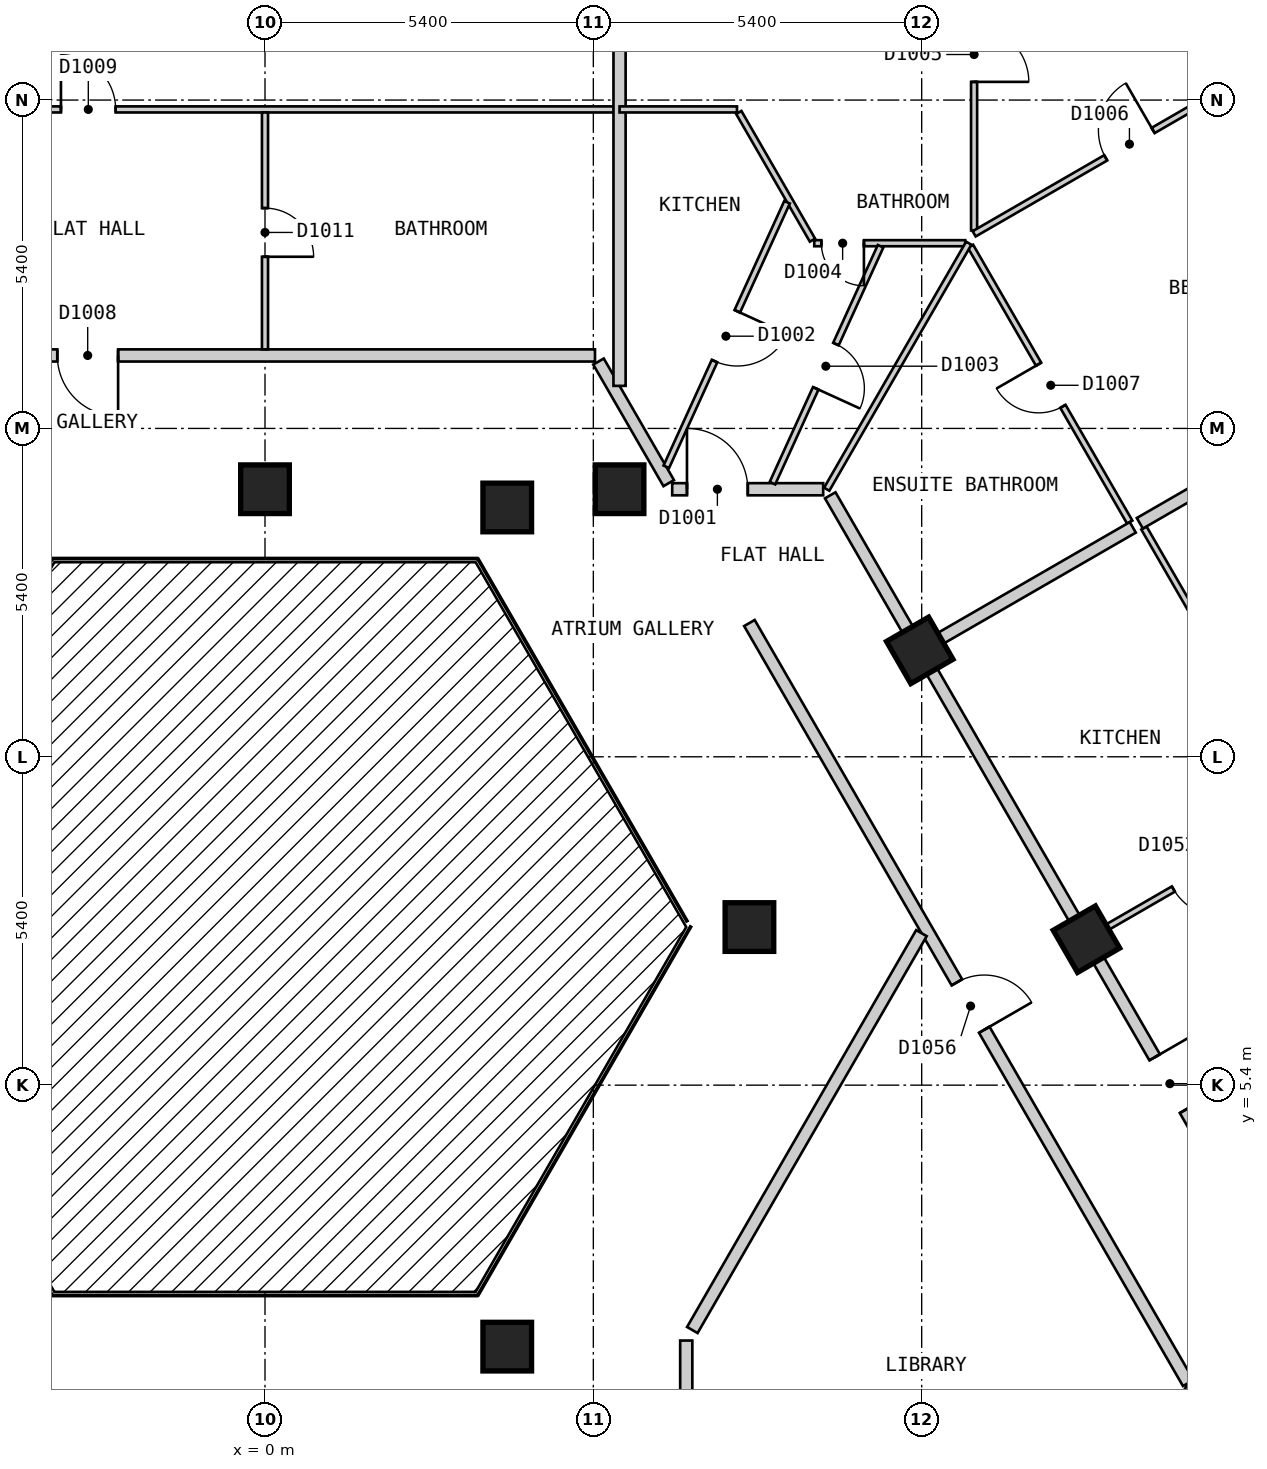
"""IFC4 building model, lengths in metres.
Left out: names, types, materials, properties, quantities, classifications, styles, units other than length and angle.
Written with IfcOpenShell. Run it as: python <this file> out.ifc"""

import sys

from ifc_helpers import new_model, si_unit, direction, frame, frame_2d, origin, origin_2d, place, context, subcontext, project, spatial, rectangle, extrude, element, fill, save


model = new_model("IFC4")
c1 = context("Model", 3, precision=1e-05, world=origin(), true_north=direction((0.0, 1.0)))
c2 = subcontext(c1, "Body", "Model", "MODEL_VIEW")
j1 = project(units=[si_unit("LENGTHUNIT", "METRE"), si_unit("PLANEANGLEUNIT", "RADIAN")], contexts=[c1])
p1 = place(None, origin())
s1 = spatial("IfcSite", under=j1, at=p1, CompositionType="ELEMENT")
p2 = place(p1, origin())
s2 = spatial("IfcBuilding", under=s1, at=p2, CompositionType="ELEMENT")
p3 = place(p2, frame((0.0, 0.0, 120.6)))
s3 = spatial("IfcBuildingStorey", under=s2, at=p3, CompositionType="ELEMENT", Elevation=120.6)
for number, where, z_axis, x_axis in (
    (1, (3.984, 1.1, 0.0), (0.0, 0.0, 1.0), (1.0, 0.0, 0.0)),
    (2, (13.51, 7.8, 0.0), (0.0, 0.0, 1.0), (-0.5, 0.866, 0.0)),
    (3, (7.967, 8.0, 0.0), (0.0, 0.0, 1.0), (1.0, 0.0, 0.0)),
    (4, (10.768, 12.55, 0.0), (0.0, 0.0, 1.0), (-0.5, 0.866, 0.0)),
    (5, (5.831, 15.2, 0.0), (0.0, 0.0, 1.0), (-1.0, 0.0, 0.0)),
    (6, (3.984, 14.9, 0.0), (0.0, 0.0, 1.0), (1.0, 0.0, 0.0)),
    (7, (0.0, 15.2, 0.0), (0.0, 0.0, 1.0), (-1.0, 0.0, 0.0)),
):
    element("IfcColumn", number, at=place(p3, frame(where, z_axis=z_axis, x_axis=x_axis)), inside=s3, PredefinedType="COLUMN", context=c2, shape_type="SweptSolid", body=[
        extrude(rectangle(XDim=0.8, YDim=0.8, at=origin_2d()), origin(), (0.0, 0.0, 1.0), 3.0),
    ])
p4 = place(p3, frame((5.485, 17.3, 0.0), z_axis=(0.0, 0.0, 1.0), x_axis=(0.500027479704, -0.866009537788, 0.0)))
e8 = element("IfcWall", 8, at=p4, inside=s3, PredefinedType="PARTITIONING", context=c2, shape_type="SweptSolid", body=[
    extrude(rectangle(XDim=2.309, YDim=0.2, at=frame_2d((1.155, 0.0))), origin(), (0.0, 0.0, 1.0), 2.7),
])
p5 = place(p3, frame((7.967, 13.0, 0.0), z_axis=(0.0, 0.0, 1.0), x_axis=(0.50003774998, -0.866003607726, 0.0)))
e9 = element("IfcWall", 9, at=p5, inside=s3, PredefinedType="PARTITIONING", context=c2, shape_type="SweptSolid", body=[
    extrude(rectangle(XDim=14.433, YDim=0.2, at=frame_2d((7.217, 0.0))), origin(), (0.0, 0.0, 1.0), 2.7),
])
p6 = place(p5, frame((6.824, 0.0, 0.0)))
e10 = element("IfcOpeningElement", 10, at=p6, cuts=e9, PredefinedType="OPENING", context=c2, shape_type="SweptSolid", body=[
    extrude(rectangle(XDim=0.9, YDim=2.1, at=frame_2d((0.45, 1.05))), frame((0.0, 0.11, 0.0), z_axis=(0.0, -1.0, 0.0), x_axis=(1.0, 0.0, 0.0)), (0.0, 0.0, 1.0), 0.22),
])
p7 = place(p3, frame((9.296, 15.1, 0.0), z_axis=(0.0, 0.0, 1.0), x_axis=(0.499974024244, -0.866040400375, 0.0)))
e11 = element("IfcWall", 11, at=p7, inside=s3, PredefinedType="PARTITIONING", context=c2, shape_type="SweptSolid", body=[
    extrude(rectangle(XDim=16.857, YDim=0.2, at=frame_2d((8.429, 0.0))), origin(), (0.0, 0.0, 1.0), 2.7),
])
p8 = place(p7, frame((10.672, 0.0, 0.0)))
e12 = element("IfcOpeningElement", 12, at=p8, cuts=e11, PredefinedType="OPENING", context=c2, shape_type="SweptSolid", body=[
    extrude(rectangle(XDim=1.0, YDim=2.1, at=frame_2d((0.5, 1.05))), frame((0.0, 0.11, 0.0), z_axis=(0.0, -1.0, 0.0), x_axis=(1.0, 0.0, 0.0)), (0.0, 0.0, 1.0), 0.22),
])
p9 = place(p3, frame((6.697, 15.2, 0.0), z_axis=(0.0, 0.0, 1.0), x_axis=(1.0, 0.0, 0.0)))
e13 = element("IfcWall", 13, at=p9, inside=s3, PredefinedType="PARTITIONING", context=c2, shape_type="SweptSolid", body=[
    extrude(rectangle(XDim=2.483, YDim=0.2, at=frame_2d((1.241, 0.0))), origin(), (0.0, 0.0, 1.0), 2.7),
])
p10 = place(p9, frame((0.243, 0.0, 0.0)))
e14 = element("IfcOpeningElement", 14, at=p10, cuts=e13, PredefinedType="OPENING", context=c2, shape_type="SweptSolid", body=[
    extrude(rectangle(XDim=1.0, YDim=2.1, at=frame_2d((0.5, 1.05))), frame((0.0, 0.11, 0.0), z_axis=(0.0, -1.0, 0.0), x_axis=(1.0, 0.0, 0.0)), (0.0, 0.0, 1.0), 0.22),
])
p11 = place(p3, frame((-5.312, 17.4, 0.0), z_axis=(0.0, 0.0, 1.0), x_axis=(1.0, 0.0, 0.0)))
e15 = element("IfcWall", 15, at=p11, inside=s3, PredefinedType="PARTITIONING", context=c2, shape_type="SweptSolid", body=[
    extrude(rectangle(XDim=10.739, YDim=0.2, at=frame_2d((5.37, 0.0))), origin(), (0.0, 0.0, 1.0), 2.7),
])
p12 = place(p11, frame((1.896, 0.0, 0.0)))
e16 = element("IfcOpeningElement", 16, at=p12, cuts=e15, PredefinedType="OPENING", context=c2, shape_type="SweptSolid", body=[
    extrude(rectangle(XDim=1.0, YDim=2.1, at=frame_2d((0.5, 1.05))), frame((0.0, 0.11, 0.0), z_axis=(0.0, -1.0, 0.0), x_axis=(1.0, 0.0, 0.0)), (0.0, 0.0, 1.0), 0.22),
])
p13 = place(p3, frame((7.028, 1.373, 0.0), z_axis=(0.0, 0.0, 1.0), x_axis=(0.499954271211, 0.866051803703, 0.0)))
e17 = element("IfcWall", 17, at=p13, inside=s3, PredefinedType="PARTITIONING", context=c2, shape_type="SweptSolid", body=[
    extrude(rectangle(XDim=7.536, YDim=0.2, at=frame_2d((3.768, 0.0))), origin(), (0.0, 0.0, 1.0), 2.7),
])
p14 = place(p3, frame((13.394, -2.8, 0.0), z_axis=(0.0, 0.0, 1.0), x_axis=(0.499968324138, 0.866043691079, 0.0)))
e18 = element("IfcWall", 18, at=p14, inside=s3, PredefinedType="PARTITIONING", context=c2, shape_type="SweptSolid", body=[
    extrude(rectangle(XDim=3.696, YDim=0.2, at=frame_2d((1.848, 0.0))), origin(), (0.0, 0.0, 1.0), 2.7),
])
p15 = place(p3, frame((6.928, -2.8, 0.0), z_axis=(0.0, 0.0, 1.0), x_axis=(0.0, 1.0, 0.0)))
e19 = element("IfcWall", 19, at=p15, inside=s3, PredefinedType="PARTITIONING", context=c2, shape_type="SweptSolid", body=[
    extrude(rectangle(XDim=4.0, YDim=0.2, at=frame_2d((2.0, 0.0))), origin(), (0.0, 0.0, 1.0), 2.7),
])
p16 = place(p3, frame((7.792, 21.396, 0.0), z_axis=(0.0, 0.0, 1.0), x_axis=(0.499821239653, -0.866128586522, 0.0)))
e20 = element("IfcWall", 20, at=p16, inside=s3, PredefinedType="PARTITIONING", context=c2, shape_type="SweptSolid", body=[
    extrude(rectangle(XDim=2.425, YDim=0.1, at=frame_2d((1.212, 0.0))), origin(), (0.0, 0.0, 1.0), 2.7),
])
p17 = place(p3, frame((11.603, 19.196, 0.0), z_axis=(0.0, 0.0, 1.0), x_axis=(0.499913406181, -0.866075392977, 0.0)))
e21 = element("IfcWall", 21, at=p17, inside=s3, PredefinedType="PARTITIONING", context=c2, shape_type="SweptSolid", body=[
    extrude(rectangle(XDim=5.239, YDim=0.1, at=frame_2d((2.619, 0.0))), origin(), (0.0, 0.0, 1.0), 2.7),
])
p18 = place(p17, frame((2.24, 0.0, 0.0)))
e22 = element("IfcOpeningElement", 22, at=p18, cuts=e21, PredefinedType="OPENING", context=c2, shape_type="SweptSolid", body=[
    extrude(rectangle(XDim=0.8, YDim=2.1, at=frame_2d((0.4, 1.05))), frame((0.0, 0.06, 0.0), z_axis=(0.0, -1.0, 0.0), x_axis=(1.0, 0.0, 0.0)), (0.0, 0.0, 1.0), 0.12),
])
p19 = place(p3, frame((14.455, 14.563, 0.0), z_axis=(0.0, 0.0, 1.0), x_axis=(0.500009803579, -0.866019743612, 0.0)))
e23 = element("IfcWall", 23, at=p19, inside=s3, PredefinedType="PARTITIONING", context=c2, shape_type="SweptSolid", body=[
    extrude(rectangle(XDim=16.254, YDim=0.1, at=frame_2d((8.127, 0.0))), origin(), (0.0, 0.0, 1.0), 2.7),
])
p20 = place(p19, frame((7.677, 0.0, 0.0)))
e24 = element("IfcOpeningElement", 24, at=p20, cuts=e23, PredefinedType="OPENING", context=c2, shape_type="SweptSolid", body=[
    extrude(rectangle(XDim=0.9, YDim=2.1, at=frame_2d((0.45, 1.05))), frame((0.0, 0.06, 0.0), z_axis=(0.0, -1.0, 0.0), x_axis=(1.0, 0.0, 0.0)), (0.0, 0.0, 1.0), 0.12),
])
p21 = place(p3, frame((9.033, 19.246, 0.0), z_axis=(0.0, 0.0, 1.0), x_axis=(1.0, 0.0, 0.0)))
e25 = element("IfcWall", 25, at=p21, inside=s3, PredefinedType="PARTITIONING", context=c2, shape_type="SweptSolid", body=[
    extrude(rectangle(XDim=2.483, YDim=0.1, at=frame_2d((1.242, 0.0))), origin(), (0.0, 0.0, 1.0), 2.7),
])
p22 = place(p21, frame((0.117, 0.0, 0.0)))
e26 = element("IfcOpeningElement", 26, at=p22, cuts=e25, PredefinedType="OPENING", context=c2, shape_type="SweptSolid", body=[
    extrude(rectangle(XDim=0.7, YDim=2.1, at=frame_2d((0.35, 1.05))), frame((0.0, 0.06, 0.0), z_axis=(0.0, -1.0, 0.0), x_axis=(1.0, 0.0, 0.0)), (0.0, 0.0, 1.0), 0.12),
])
p23 = place(p3, frame((-7.706, 21.446, 0.0), z_axis=(0.0, 0.0, 1.0), x_axis=(1.0, 0.0, 0.0)))
e27 = element("IfcWall", 27, at=p23, inside=s3, PredefinedType="PARTITIONING", context=c2, shape_type="SweptSolid", body=[
    extrude(rectangle(XDim=13.537, YDim=0.1, at=frame_2d((6.769, 0.0))), origin(), (0.0, 0.0, 1.0), 2.7),
])
p24 = place(p23, frame((4.35, 0.0, 0.0)))
e28 = element("IfcOpeningElement", 28, at=p24, cuts=e27, PredefinedType="OPENING", context=c2, shape_type="SweptSolid", body=[
    extrude(rectangle(XDim=0.9, YDim=2.1, at=frame_2d((0.45, 1.05))), frame((0.0, 0.06, 0.0), z_axis=(0.0, -1.0, 0.0), x_axis=(1.0, 0.0, 0.0)), (0.0, 0.0, 1.0), 0.12),
])
p25 = place(p3, frame((9.238, 15.2, 0.0), z_axis=(0.0, 0.0, 1.0), x_axis=(0.499983303743, 0.866035043158, 0.0)))
e29 = element("IfcWall", 29, at=p25, inside=s3, PredefinedType="PARTITIONING", context=c2, shape_type="SweptSolid", body=[
    extrude(rectangle(XDim=4.672, YDim=0.1, at=frame_2d((2.336, 0.0))), origin(), (0.0, 0.0, 1.0), 2.7),
])
p26 = place(p3, frame((8.346, 15.3, 0.0), z_axis=(0.0, 0.0, 1.0), x_axis=(0.415189790387, 0.909734817383, 0.0)))
e30 = element("IfcWall", 30, at=p26, inside=s3, PredefinedType="PARTITIONING", context=c2, shape_type="SweptSolid", body=[
    extrude(rectangle(XDim=4.282, YDim=0.1, at=frame_2d((2.141, 0.0))), origin(), (0.0, 0.0, 1.0), 2.7),
])
p27 = place(p26, frame((1.714, 0.0, 0.0)))
e31 = element("IfcOpeningElement", 31, at=p27, cuts=e30, PredefinedType="OPENING", context=c2, shape_type="SweptSolid", body=[
    extrude(rectangle(XDim=0.8, YDim=2.1, at=frame_2d((0.4, 1.05))), frame((0.0, 0.06, 0.0), z_axis=(0.0, -1.0, 0.0), x_axis=(1.0, 0.0, 0.0)), (0.0, 0.0, 1.0), 0.12),
])
p28 = place(p3, frame((6.6, 15.569, 0.0), z_axis=(0.0, 0.0, 1.0), x_axis=(0.415221636251, 0.909720282718, 0.0)))
e32 = element("IfcWall", 32, at=p28, inside=s3, PredefinedType="PARTITIONING", context=c2, shape_type="SweptSolid", body=[
    extrude(rectangle(XDim=4.783, YDim=0.1, at=frame_2d((2.391, 0.0))), origin(), (0.0, 0.0, 1.0), 2.7),
])
p29 = place(p28, frame((1.911, 0.0, 0.0)))
e33 = element("IfcOpeningElement", 33, at=p29, cuts=e32, PredefinedType="OPENING", context=c2, shape_type="SweptSolid", body=[
    extrude(rectangle(XDim=0.9, YDim=2.1, at=frame_2d((0.45, 1.05))), frame((0.0, 0.06, 0.0), z_axis=(0.0, -1.0, 0.0), x_axis=(1.0, 0.0, 0.0)), (0.0, 0.0, 1.0), 0.12),
])
p30 = place(p3, frame((11.662, 19.456, 0.0), z_axis=(0.0, 0.0, 1.0), x_axis=(0.0, 1.0, 0.0)))
e34 = element("IfcWall", 34, at=p30, inside=s3, PredefinedType="PARTITIONING", context=c2, shape_type="SweptSolid", body=[
    extrude(rectangle(XDim=5.844, YDim=0.1, at=frame_2d((2.922, 0.0))), origin(), (0.0, 0.0, 1.0), 2.7),
])
p31 = place(p30, frame((2.443, 0.0, 0.0)))
e35 = element("IfcOpeningElement", 35, at=p31, cuts=e34, PredefinedType="OPENING", context=c2, shape_type="SweptSolid", body=[
    extrude(rectangle(XDim=0.9, YDim=2.1, at=frame_2d((0.45, 1.05))), frame((0.0, 0.06, 0.0), z_axis=(0.0, -1.0, 0.0), x_axis=(1.0, 0.0, 0.0)), (0.0, 0.0, 1.0), 0.12),
])
p32 = place(p3, frame((0.0, 17.5, 0.0), z_axis=(0.0, 0.0, 1.0), x_axis=(0.0, 1.0, 0.0)))
e36 = element("IfcWall", 36, at=p32, inside=s3, PredefinedType="PARTITIONING", context=c2, shape_type="SweptSolid", body=[
    extrude(rectangle(XDim=3.896, YDim=0.1, at=frame_2d((1.948, 0.0))), origin(), (0.0, 0.0, 1.0), 2.7),
])
p33 = place(p32, frame((1.523, 0.0, 0.0)))
e37 = element("IfcOpeningElement", 37, at=p33, cuts=e36, PredefinedType="OPENING", context=c2, shape_type="SweptSolid", body=[
    extrude(rectangle(XDim=0.8, YDim=2.1, at=frame_2d((0.4, 1.05))), frame((0.0, 0.06, 0.0), z_axis=(0.0, -1.0, 0.0), x_axis=(1.0, 0.0, 0.0)), (0.0, 0.0, 1.0), 0.12),
])
p34 = place(p3, frame((13.597, 7.85, 0.0), z_axis=(0.0, 0.0, 1.0), x_axis=(0.866006068523, 0.500033488159, 0.0)))
e38 = element("IfcWall", 38, at=p34, inside=s3, PredefinedType="PARTITIONING", context=c2, shape_type="SweptSolid", body=[
    extrude(rectangle(XDim=4.099, YDim=0.1, at=frame_2d((2.05, 0.0))), origin(), (0.0, 0.0, 1.0), 2.7),
])
p35 = place(p34, frame((1.55, 0.0, 0.0)))
e39 = element("IfcOpeningElement", 39, at=p35, cuts=e38, PredefinedType="OPENING", context=c2, shape_type="SweptSolid", body=[
    extrude(rectangle(XDim=0.9, YDim=2.1, at=frame_2d((0.45, 1.05))), frame((0.0, 0.06, 0.0), z_axis=(0.0, -1.0, 0.0), x_axis=(1.0, 0.0, 0.0)), (0.0, 0.0, 1.0), 0.12),
])
p36 = place(p3, frame((11.663, 19.4, 0.0), z_axis=(0.0, 0.0, 1.0), x_axis=(0.865941558533, 0.500145196124, 0.0)))
e40 = element("IfcWall", 40, at=p36, inside=s3, PredefinedType="PARTITIONING", context=c2, shape_type="SweptSolid", body=[
    extrude(rectangle(XDim=5.899, YDim=0.1, at=frame_2d((2.949, 0.0))), origin(), (0.0, 0.0, 1.0), 2.7),
])
p37 = place(p36, frame((2.499, 0.0, 0.0)))
e41 = element("IfcOpeningElement", 41, at=p37, cuts=e40, PredefinedType="OPENING", context=c2, shape_type="SweptSolid", body=[
    extrude(rectangle(XDim=0.9, YDim=2.1, at=frame_2d((0.45, 1.05))), frame((0.0, 0.06, 0.0), z_axis=(0.0, -1.0, 0.0), x_axis=(1.0, 0.0, 0.0)), (0.0, 0.0, 1.0), 0.12),
])
p38 = place(p3, frame((5.831, 16.9, 0.0), z_axis=(0.0, 0.0, 1.0), x_axis=(0.0, 1.0, 0.0)))
e42 = element("IfcWall", 42, at=p38, inside=s3, PredefinedType="PARTITIONING", context=c2, shape_type="SweptSolid", body=[
    extrude(rectangle(XDim=8.4, YDim=0.2, at=frame_2d((4.2, 0.0))), origin(), (0.0, 0.0, 1.0), 2.7),
])
p39 = place(p3, frame((10.854, 12.6, 0.0), z_axis=(0.0, 0.0, 1.0), x_axis=(0.866076396086, 0.499911668341, 0.0)))
e43 = element("IfcWall", 43, at=p39, inside=s3, PredefinedType="PARTITIONING", context=c2, shape_type="SweptSolid", body=[
    extrude(rectangle(XDim=3.947, YDim=0.2, at=frame_2d((1.973, 0.0))), origin(), (0.0, 0.0, 1.0), 2.7),
])
p40 = place(p3, frame((14.388, 14.64, 0.0), z_axis=(0.0, 0.0, 1.0), x_axis=(0.866044090212, 0.499967632761, 0.0)))
e44 = element("IfcWall", 44, at=p40, inside=s3, PredefinedType="PARTITIONING", context=c2, shape_type="SweptSolid", body=[
    extrude(rectangle(XDim=5.919, YDim=0.2, at=frame_2d((2.959, 0.0))), origin(), (0.0, 0.0, 1.0), 2.7),
])
p41 = place(p3, frame((5.831, 21.446, 0.0), z_axis=(0.0, 0.0, 1.0), x_axis=(1.0, 0.0, 0.0)))
e45 = element("IfcWall", 45, at=p41, inside=s3, PredefinedType="PARTITIONING", context=c2, shape_type="SweptSolid", body=[
    extrude(rectangle(XDim=1.932, YDim=0.1, at=frame_2d((0.966, 0.0))), origin(), (0.0, 0.0, 1.0), 2.7),
])
p42 = place(p10, origin())
e46 = element("IfcDoor", 46, at=p42, inside=s3, OperationType="SINGLE_SWING_LEFT", PredefinedType="DOOR", context=c2, shape_type="SweptSolid", body=[
    extrude(rectangle(XDim=1.0, YDim=2.1, at=frame_2d((0.5, 1.05))), frame((0.0, 0.025, 0.0), z_axis=(0.0, -1.0, 0.0), x_axis=(1.0, 0.0, 0.0)), (0.0, 0.0, 1.0), 0.05),
])
fill(e14, e46)
p43 = place(p29, origin())
e47 = element("IfcDoor", 47, at=p43, inside=s3, OperationType="SINGLE_SWING_RIGHT", PredefinedType="DOOR", context=c2, shape_type="SweptSolid", body=[
    extrude(rectangle(XDim=0.9, YDim=2.1, at=frame_2d((0.45, 1.05))), frame((0.0, 0.025, 0.0), z_axis=(0.0, -1.0, 0.0), x_axis=(1.0, 0.0, 0.0)), (0.0, 0.0, 1.0), 0.05),
])
fill(e33, e47)
p44 = place(p27, origin())
e48 = element("IfcDoor", 48, at=p44, inside=s3, OperationType="SINGLE_SWING_LEFT", PredefinedType="DOOR", context=c2, shape_type="SweptSolid", body=[
    extrude(rectangle(XDim=0.8, YDim=2.1, at=frame_2d((0.4, 1.05))), frame((0.0, 0.025, 0.0), z_axis=(0.0, -1.0, 0.0), x_axis=(1.0, 0.0, 0.0)), (0.0, 0.0, 1.0), 0.05),
])
fill(e31, e48)
p45 = place(p22, origin())
e49 = element("IfcDoor", 49, at=p45, inside=s3, OperationType="SINGLE_SWING_RIGHT", PredefinedType="DOOR", context=c2, shape_type="SweptSolid", body=[
    extrude(rectangle(XDim=0.7, YDim=2.1, at=frame_2d((0.35, 1.05))), frame((0.0, 0.025, 0.0), z_axis=(0.0, -1.0, 0.0), x_axis=(1.0, 0.0, 0.0)), (0.0, 0.0, 1.0), 0.05),
])
fill(e26, e49)
p46 = place(p31, origin())
e50 = element("IfcDoor", 50, at=p46, inside=s3, OperationType="SINGLE_SWING_LEFT", PredefinedType="DOOR", context=c2, shape_type="SweptSolid", body=[
    extrude(rectangle(XDim=0.9, YDim=2.1, at=frame_2d((0.45, 1.05))), frame((0.0, 0.025, 0.0), z_axis=(0.0, -1.0, 0.0), x_axis=(1.0, 0.0, 0.0)), (0.0, 0.0, 1.0), 0.05),
])
fill(e35, e50)
p47 = place(p37, origin())
e51 = element("IfcDoor", 51, at=p47, inside=s3, OperationType="SINGLE_SWING_RIGHT", PredefinedType="DOOR", context=c2, shape_type="SweptSolid", body=[
    extrude(rectangle(XDim=0.9, YDim=2.1, at=frame_2d((0.45, 1.05))), frame((0.0, 0.025, 0.0), z_axis=(0.0, -1.0, 0.0), x_axis=(1.0, 0.0, 0.0)), (0.0, 0.0, 1.0), 0.05),
])
fill(e41, e51)
p48 = place(p18, origin())
e52 = element("IfcDoor", 52, at=p48, inside=s3, OperationType="SINGLE_SWING_LEFT", PredefinedType="DOOR", context=c2, shape_type="SweptSolid", body=[
    extrude(rectangle(XDim=0.8, YDim=2.1, at=frame_2d((0.4, 1.05))), frame((0.0, 0.025, 0.0), z_axis=(0.0, -1.0, 0.0), x_axis=(1.0, 0.0, 0.0)), (0.0, 0.0, 1.0), 0.05),
])
fill(e22, e52)
p49 = place(p12, origin())
e53 = element("IfcDoor", 53, at=p49, inside=s3, OperationType="SINGLE_SWING_RIGHT", PredefinedType="DOOR", context=c2, shape_type="SweptSolid", body=[
    extrude(rectangle(XDim=1.0, YDim=2.1, at=frame_2d((0.5, 1.05))), frame((0.0, 0.025, 0.0), z_axis=(0.0, -1.0, 0.0), x_axis=(1.0, 0.0, 0.0)), (0.0, 0.0, 1.0), 0.05),
])
fill(e16, e53)
p50 = place(p24, origin())
e54 = element("IfcDoor", 54, at=p50, inside=s3, OperationType="SINGLE_SWING_LEFT", PredefinedType="DOOR", context=c2, shape_type="SweptSolid", body=[
    extrude(rectangle(XDim=0.9, YDim=2.1, at=frame_2d((0.45, 1.05))), frame((0.0, 0.025, 0.0), z_axis=(0.0, -1.0, 0.0), x_axis=(1.0, 0.0, 0.0)), (0.0, 0.0, 1.0), 0.05),
])
fill(e28, e54)
p51 = place(p33, origin())
e55 = element("IfcDoor", 55, at=p51, inside=s3, OperationType="SINGLE_SWING_LEFT", PredefinedType="DOOR", context=c2, shape_type="SweptSolid", body=[
    extrude(rectangle(XDim=0.8, YDim=2.1, at=frame_2d((0.4, 1.05))), frame((0.0, 0.025, 0.0), z_axis=(0.0, -1.0, 0.0), x_axis=(1.0, 0.0, 0.0)), (0.0, 0.0, 1.0), 0.05),
])
fill(e37, e55)
p52 = place(p8, origin())
e56 = element("IfcDoor", 56, at=p52, inside=s3, OperationType="SINGLE_SWING_LEFT", PredefinedType="DOOR", context=c2, shape_type="SweptSolid", body=[
    extrude(rectangle(XDim=1.0, YDim=2.1, at=frame_2d((0.5, 1.05))), frame((0.0, 0.025, 0.0), z_axis=(0.0, -1.0, 0.0), x_axis=(1.0, 0.0, 0.0)), (0.0, 0.0, 1.0), 0.05),
])
fill(e12, e56)
p53 = place(p35, origin())
e57 = element("IfcDoor", 57, at=p53, inside=s3, OperationType="SINGLE_SWING_RIGHT", PredefinedType="DOOR", context=c2, shape_type="SweptSolid", body=[
    extrude(rectangle(XDim=0.9, YDim=2.1, at=frame_2d((0.45, 1.05))), frame((0.0, 0.025, 0.0), z_axis=(0.0, -1.0, 0.0), x_axis=(1.0, 0.0, 0.0)), (0.0, 0.0, 1.0), 0.05),
])
fill(e39, e57)
p54 = place(p6, origin())
e58 = element("IfcDoor", 58, at=p54, inside=s3, OperationType="SINGLE_SWING_RIGHT", PredefinedType="DOOR", context=c2, shape_type="SweptSolid", body=[
    extrude(rectangle(XDim=0.9, YDim=2.1, at=frame_2d((0.45, 1.05))), frame((0.0, 0.025, 0.0), z_axis=(0.0, -1.0, 0.0), x_axis=(1.0, 0.0, 0.0)), (0.0, 0.0, 1.0), 0.05),
])
fill(e10, e58)
save(model, sys.argv[1])
